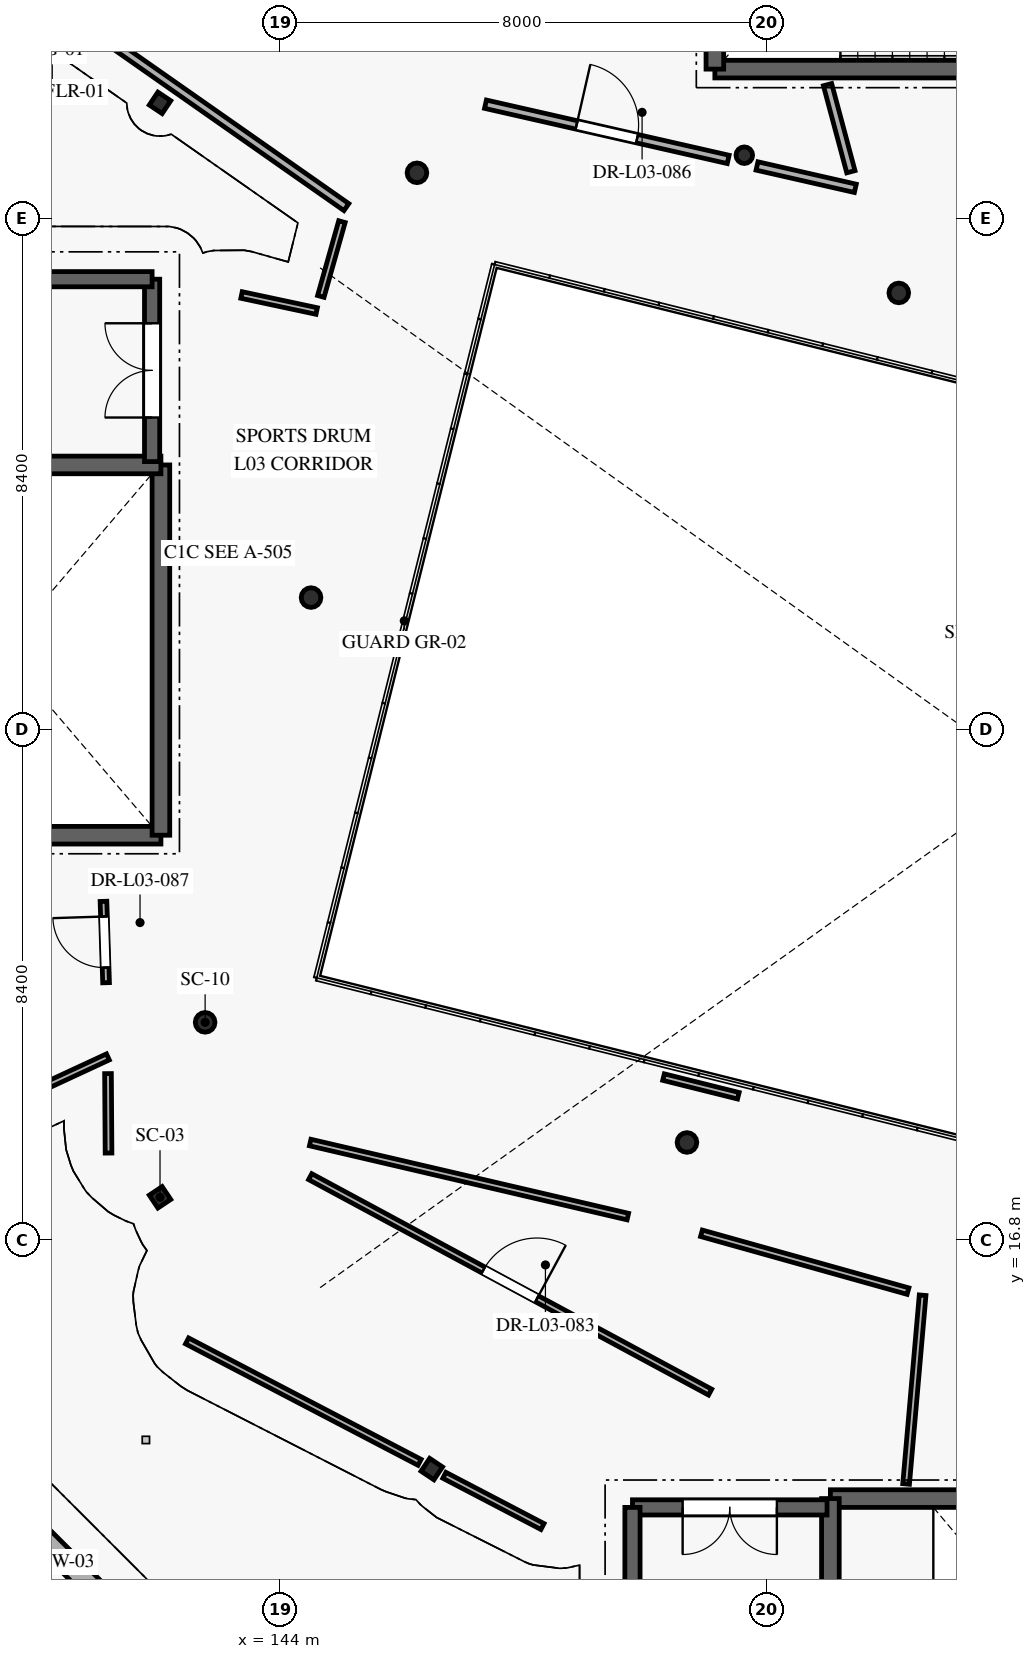
"""IFC4 building model, lengths in metres.
Left out: names, types, materials, properties, quantities, classifications, styles, units other than length and angle.
Written with IfcOpenShell. Run it as: python <this file> out.ifc"""

import sys

from ifc_helpers import new_model, si_unit, direction, frame, frame_2d, origin, origin_2d, place, context, subcontext, project, spatial, rectangle, hollow_circle, i_section, extrude, element, fill, save


model = new_model("IFC4")
c1 = context("Model", 3, precision=1e-05, world=origin(), true_north=direction((0.0, 1.0)))
c2 = subcontext(c1, "Body", "Model", "MODEL_VIEW")
j1 = project(units=[si_unit("LENGTHUNIT", "METRE"), si_unit("PLANEANGLEUNIT", "RADIAN")], contexts=[c1])
p1 = place(None, origin())
s1 = spatial("IfcSite", under=j1, at=p1, CompositionType="ELEMENT")
p2 = place(p1, origin())
s2 = spatial("IfcBuilding", under=s1, at=p2, CompositionType="ELEMENT")
p3 = place(p2, frame((0.0, 0.0, 12.6)))
s3 = spatial("IfcBuildingStorey", under=s2, at=p3, CompositionType="ELEMENT", Elevation=12.6)
for number, where, z_axis, x_axis in (
    (1, (142.772, 20.377, 0.0), (0.0, 0.0, 1.0), (0.97, -0.242, 0.0)),
    (2, (144.514, 27.364, 0.0), (0.0, 0.0, 1.0), (0.97, -0.242, 0.0)),
    (3, (146.256, 34.35, 0.0), (0.0, 0.0, 1.0), (0.97, -0.242, 0.0)),
    (4, (150.696, 18.402, 0.0), (0.0, 0.0, 1.0), (0.97, -0.242, 0.0)),
    (5, (154.18, 32.374, 0.0), (0.0, 0.0, 1.0), (0.97, -0.242, 0.0)),
):
    element("IfcColumn", number, at=place(p3, frame(where, z_axis=z_axis, x_axis=x_axis)), inside=s3, PredefinedType="COLUMN", context=c2, shape_type="SweptSolid", body=[
        extrude(hollow_circle(Radius=0.162, WallThickness=0.016, at=origin_2d()), origin(), (0.0, 0.0, 1.0), 4.2),
    ])
p4 = place(p3, frame((151.639, 34.639, 0.0), z_axis=(0.0, 0.0, 1.0), x_axis=(0.707106781187, -0.707106781187, 0.0)))
e6 = element("IfcColumn", 6, at=p4, inside=s3, PredefinedType="COLUMN", context=c2, shape_type="SweptSolid", body=[
    extrude(hollow_circle(Radius=0.136, WallThickness=0.012, at=origin_2d()), origin(), (0.0, 0.0, 1.0), 4.2),
])
for number, where, z_axis, x_axis in (
    (7, (142.03, 35.5, 0.0), (0.0, 0.0, 1.0), (-0.556, -0.831, 0.0)),
    (8, (142.03, 17.5, 0.0), (0.0, 0.0, 1.0), (0.556, -0.831, 0.0)),
    (9, (146.5, 13.03, 0.0), (0.0, 0.0, 1.0), (0.831, -0.556, 0.0)),
):
    element("IfcColumn", number, at=place(p3, frame(where, z_axis=z_axis, x_axis=x_axis)), inside=s3, PredefinedType="COLUMN", context=c2, shape_type="SweptSolid", body=[
        extrude(i_section(OverallWidth=0.255, OverallDepth=0.254, WebThickness=0.009, FlangeThickness=0.014, FilletRadius=0.013, at=origin_2d()), origin(), (0.0, 0.0, 1.0), 4.2),
    ])
p5 = place(p3, frame((143.484, 8.517, 0.0), z_axis=(0.0, 0.0, 1.0), x_axis=(-0.707106781187, 0.707106781187, 0.0)))
e10 = element("IfcWall", 10, at=p5, inside=s3, PredefinedType="SOLIDWALL", context=c2, shape_type="SweptSolid", body=[
    extrude(rectangle(XDim=8.439, YDim=0.35, at=frame_2d((4.219, 0.0))), origin(), (0.0, 0.0, 1.0), 3.94),
])
p6 = place(p5, frame((1.035, 0.0, 0.85)))
e11 = element("IfcOpeningElement", 11, at=p6, cuts=e10, PredefinedType="OPENING", context=c2, shape_type="SweptSolid", body=[
    extrude(rectangle(XDim=2.15, YDim=1.4, at=frame_2d((1.075, 0.7))), frame((0.0, 0.185, 0.0), z_axis=(0.0, -1.0, 0.0), x_axis=(1.0, 0.0, 0.0)), (0.0, 0.0, 1.0), 0.37),
])
p7 = place(p5, frame((5.179, 0.0, 0.85)))
e12 = element("IfcOpeningElement", 12, at=p7, cuts=e10, PredefinedType="OPENING", context=c2, shape_type="SweptSolid", body=[
    extrude(rectangle(XDim=2.3, YDim=1.4, at=frame_2d((1.15, 0.7))), frame((0.0, 0.185, 0.0), z_axis=(0.0, -1.0, 0.0), x_axis=(1.0, 0.0, 0.0)), (0.0, 0.0, 1.0), 0.37),
])
p8 = place(p3, frame((136.767, 13.586, 0.0), z_axis=(0.0, 0.0, 1.0), x_axis=(0.707106781187, -0.707106781187, 0.0)))
e13 = element("IfcWall", 13, at=p8, inside=s3, PredefinedType="ELEMENTEDWALL", context=c2, shape_type="SweptSolid", body=[
    extrude(rectangle(XDim=8.23, YDim=0.225, at=frame_2d((4.115, 0.0))), origin(), (0.0, 0.0, 1.0), 1.09),
])
p9 = place(p3, frame((151.155, 36.055, 0.0), z_axis=(0.0, 0.0, 1.0), x_axis=(1.0, 0.0, 0.0)))
e14 = element("IfcWall", 14, at=p9, inside=s3, PredefinedType="SHEAR", context=c2, shape_type="SweptSolid", body=[
    extrude(rectangle(XDim=6.89, YDim=0.29, at=frame_2d((3.445, 0.0))), origin(), (0.0, 0.0, 1.0), 3.95),
])
p10 = place(p3, frame((151.155, 42.345, 0.0), z_axis=(0.0, 0.0, 1.0), x_axis=(0.0, -1.0, 0.0)))
e15 = element("IfcWall", 15, at=p10, inside=s3, PredefinedType="SHEAR", context=c2, shape_type="SweptSolid", body=[
    extrude(rectangle(XDim=6.29, YDim=0.29, at=frame_2d((3.145, 0.0))), origin(), (0.0, 0.0, 1.0), 3.95),
])
p11 = place(p3, frame((159.945, 12.545, 0.0), z_axis=(0.0, 0.0, 1.0), x_axis=(-1.0, 0.0, 0.0)))
e16 = element("IfcWall", 16, at=p11, inside=s3, PredefinedType="SHEAR", context=c2, shape_type="SweptSolid", body=[
    extrude(rectangle(XDim=6.89, YDim=0.29, at=frame_2d((3.445, 0.0))), origin(), (0.0, 0.0, 1.0), 3.95),
])
p12 = place(p3, frame((153.055, 12.545, 0.0), z_axis=(0.0, 0.0, 1.0), x_axis=(0.0, -1.0, 0.0)))
e17 = element("IfcWall", 17, at=p12, inside=s3, PredefinedType="SHEAR", context=c2, shape_type="SweptSolid", body=[
    extrude(rectangle(XDim=6.29, YDim=0.29, at=frame_2d((3.145, 0.0))), origin(), (0.0, 0.0, 1.0), 3.95),
])
p13 = place(p12, frame((2.52, 0.0, 0.0)))
e18 = element("IfcOpeningElement", 18, at=p13, cuts=e17, PredefinedType="OPENING", context=c2, shape_type="SweptSolid", body=[
    extrude(rectangle(XDim=1.25, YDim=2.1, at=frame_2d((0.625, 1.05))), frame((0.0, 0.155, 0.0), z_axis=(0.0, -1.0, 0.0), x_axis=(1.0, 0.0, 0.0)), (0.0, 0.0, 1.0), 0.31),
])
p14 = place(p3, frame((153.0, 12.4, 0.0), z_axis=(0.0, 0.0, 1.0), x_axis=(-1.0, 0.0, 0.0)))
e19 = element("IfcWall", 19, at=p14, inside=s3, PredefinedType="SHEAR", context=c2, shape_type="SweptSolid", body=[
    extrude(rectangle(XDim=3.2, YDim=0.25, at=frame_2d((1.6, 0.0))), origin(), (0.0, 0.0, 1.0), 3.95),
])
p15 = place(p14, frame((0.825, 0.0, 0.0)))
e20 = element("IfcOpeningElement", 20, at=p15, cuts=e19, PredefinedType="OPENING", context=c2, shape_type="SweptSolid", body=[
    extrude(rectangle(XDim=1.55, YDim=2.15, at=frame_2d((0.775, 1.075))), frame((0.0, 0.135, 0.0), z_axis=(0.0, -1.0, 0.0), x_axis=(1.0, 0.0, 0.0)), (0.0, 0.0, 1.0), 0.27),
])
p16 = place(p3, frame((149.8, 12.4, 0.0), z_axis=(0.0, 0.0, 1.0), x_axis=(0.0, -1.0, 0.0)))
e21 = element("IfcWall", 21, at=p16, inside=s3, PredefinedType="SHEAR", context=c2, shape_type="SweptSolid", body=[
    extrude(rectangle(XDim=6.0, YDim=0.25, at=frame_2d((3.0, 0.0))), origin(), (0.0, 0.0, 1.0), 3.95),
])
p17 = place(p3, frame((135.255, 23.455, 0.0), z_axis=(0.0, 0.0, 1.0), x_axis=(1.0, 0.0, 0.0)))
e22 = element("IfcWall", 22, at=p17, inside=s3, PredefinedType="SHEAR", context=c2, shape_type="SweptSolid", body=[
    extrude(rectangle(XDim=6.79, YDim=0.29, at=frame_2d((3.395, 0.0))), origin(), (0.0, 0.0, 1.0), 3.95),
])
p18 = place(p3, frame((142.045, 23.455, 0.0), z_axis=(0.0, 0.0, 1.0), x_axis=(0.0, 1.0, 0.0)))
e23 = element("IfcWall", 23, at=p18, inside=s3, PredefinedType="SHEAR", context=c2, shape_type="SweptSolid", body=[
    extrude(rectangle(XDim=6.09, YDim=0.29, at=frame_2d((3.045, 0.0))), origin(), (0.0, 0.0, 1.0), 3.95),
])
p19 = place(p3, frame((142.045, 29.545, 0.0), z_axis=(0.0, 0.0, 1.0), x_axis=(-1.0, 0.0, 0.0)))
e24 = element("IfcWall", 24, at=p19, inside=s3, PredefinedType="SHEAR", context=c2, shape_type="SweptSolid", body=[
    extrude(rectangle(XDim=6.79, YDim=0.29, at=frame_2d((3.395, 0.0))), origin(), (0.0, 0.0, 1.0), 3.95),
])
p20 = place(p19, frame((5.25, 0.0, 0.0)))
e25 = element("IfcOpeningElement", 25, at=p20, cuts=e24, PredefinedType="OPENING", context=c2, shape_type="SweptSolid", body=[
    extrude(rectangle(XDim=1.15, YDim=2.1, at=frame_2d((0.575, 1.05))), frame((0.0, 0.155, 0.0), z_axis=(0.0, -1.0, 0.0), x_axis=(1.0, 0.0, 0.0)), (0.0, 0.0, 1.0), 0.31),
])
p21 = place(p3, frame((141.9, 29.6, 0.0), z_axis=(0.0, 0.0, 1.0), x_axis=(0.0, 1.0, 0.0)))
e26 = element("IfcWall", 26, at=p21, inside=s3, PredefinedType="SHEAR", context=c2, shape_type="SweptSolid", body=[
    extrude(rectangle(XDim=3.0, YDim=0.25, at=frame_2d((1.5, 0.0))), origin(), (0.0, 0.0, 1.0), 3.95),
])
p22 = place(p21, frame((0.725, 0.0, 0.0)))
e27 = element("IfcOpeningElement", 27, at=p22, cuts=e26, PredefinedType="OPENING", context=c2, shape_type="SweptSolid", body=[
    extrude(rectangle(XDim=1.55, YDim=2.15, at=frame_2d((0.775, 1.075))), frame((0.0, 0.135, 0.0), z_axis=(0.0, -1.0, 0.0), x_axis=(1.0, 0.0, 0.0)), (0.0, 0.0, 1.0), 0.27),
])
p23 = place(p3, frame((141.9, 32.6, 0.0), z_axis=(0.0, 0.0, 1.0), x_axis=(-1.0, 0.0, 0.0)))
e28 = element("IfcWall", 28, at=p23, inside=s3, PredefinedType="SHEAR", context=c2, shape_type="SweptSolid", body=[
    extrude(rectangle(XDim=6.5, YDim=0.25, at=frame_2d((3.25, 0.0))), origin(), (0.0, 0.0, 1.0), 3.95),
])
p24 = place(p3, frame((141.173, 19.809, 0.0), z_axis=(0.0, 0.0, 1.0), x_axis=(-0.90703456181, -0.421056176397, 0.0)))
e29 = element("IfcWall", 29, at=p24, inside=s3, PredefinedType="PARTITIONING", context=c2, shape_type="SweptSolid", body=[
    extrude(rectangle(XDim=5.205, YDim=0.11, at=frame_2d((2.602, 0.0))), origin(), (0.0, 0.0, 1.0), 3.95),
])
p25 = place(p3, frame((154.3, 12.785, 0.0), z_axis=(0.0, 0.0, 1.0), x_axis=(0.08719416146, 0.996191336143, 0.0)))
e30 = element("IfcWall", 30, at=p25, inside=s3, PredefinedType="PARTITIONING", context=c2, shape_type="SweptSolid", body=[
    extrude(rectangle(XDim=3.116, YDim=0.11, at=frame_2d((1.558, 0.0))), origin(), (0.0, 0.0, 1.0), 3.95),
])
p26 = place(p3, frame((154.331, 15.957, 0.0), z_axis=(0.0, 0.0, 1.0), x_axis=(-0.96293957609, 0.269717208943, 0.0)))
e31 = element("IfcWall", 31, at=p26, inside=s3, PredefinedType="PARTITIONING", context=c2, shape_type="SweptSolid", body=[
    extrude(rectangle(XDim=3.527, YDim=0.11, at=frame_2d((1.764, 0.0))), origin(), (0.0, 0.0, 1.0), 3.95),
])
p27 = place(p3, frame((151.541, 19.17, 0.0), z_axis=(0.0, 0.0, 1.0), x_axis=(-0.970278241174, 0.241992013721, 0.0)))
e32 = element("IfcWall", 32, at=p27, inside=s3, PredefinedType="PARTITIONING", context=c2, shape_type="SweptSolid", body=[
    extrude(rectangle(XDim=1.268, YDim=0.11, at=frame_2d((0.634, 0.0))), origin(), (0.0, 0.0, 1.0), 3.95),
])
p28 = place(p3, frame((149.724, 17.183, 0.0), z_axis=(0.0, 0.0, 1.0), x_axis=(-0.973885509314, 0.227039676596, 0.0)))
e33 = element("IfcWall", 33, at=p28, inside=s3, PredefinedType="PARTITIONING", context=c2, shape_type="SweptSolid", body=[
    extrude(rectangle(XDim=5.364, YDim=0.11, at=frame_2d((2.682, 0.0))), origin(), (0.0, 0.0, 1.0), 3.95),
])
p29 = place(p3, frame((144.5, 17.84, 0.0), z_axis=(0.0, 0.0, 1.0), x_axis=(0.880350401945, -0.474323908101, 0.0)))
e34 = element("IfcWall", 34, at=p29, inside=s3, PredefinedType="PARTITIONING", context=c2, shape_type="SweptSolid", body=[
    extrude(rectangle(XDim=7.471, YDim=0.11, at=frame_2d((3.735, 0.0))), origin(), (0.0, 0.0, 1.0), 3.95),
])
p30 = place(p29, frame((3.236, 0.0, 0.0)))
e35 = element("IfcOpeningElement", 35, at=p30, cuts=e34, PredefinedType="OPENING", context=c2, shape_type="SweptSolid", body=[
    extrude(rectangle(XDim=1.0, YDim=2.1, at=frame_2d((0.5, 1.05))), frame((0.0, 0.065, 0.0), z_axis=(0.0, -1.0, 0.0), x_axis=(1.0, 0.0, 0.0)), (0.0, 0.0, 1.0), 0.13),
])
p31 = place(p3, frame((148.32, 12.085, 0.0), z_axis=(0.0, 0.0, 1.0), x_axis=(-0.886374313461, 0.46296930399, 0.0)))
e36 = element("IfcWall", 36, at=p31, inside=s3, PredefinedType="PARTITIONING", context=c2, shape_type="SweptSolid", body=[
    extrude(rectangle(XDim=1.82, YDim=0.11, at=frame_2d((0.91, 0.0))), origin(), (0.0, 0.0, 1.0), 3.95),
])
p32 = place(p3, frame((146.299, 13.141, 0.0), z_axis=(0.0, 0.0, 1.0), x_axis=(-0.886374847625, 0.462968281309, 0.0)))
e37 = element("IfcWall", 37, at=p32, inside=s3, PredefinedType="PARTITIONING", context=c2, shape_type="SweptSolid", body=[
    extrude(rectangle(XDim=4.314, YDim=0.11, at=frame_2d((2.157, 0.0))), origin(), (0.0, 0.0, 1.0), 3.424),
])
p33 = place(p3, frame((141.184, 18.228, 0.0), z_axis=(0.0, 0.0, 1.0), x_axis=(-0.006727562196, 0.999977369697, 0.0)))
e38 = element("IfcWall", 38, at=p33, inside=s3, PredefinedType="PARTITIONING", context=c2, shape_type="SweptSolid", body=[
    extrude(rectangle(XDim=1.306, YDim=0.11, at=frame_2d((0.653, 0.0))), origin(), (0.0, 0.0, 1.0), 3.95),
])
p34 = place(p3, frame((147.383, 35.478, 0.0), z_axis=(0.0, 0.0, 1.0), x_axis=(0.97509006868, -0.221809282857, 0.0)))
e39 = element("IfcWall", 39, at=p34, inside=s3, PredefinedType="PLUMBINGWALL", context=c2, shape_type="SweptSolid", body=[
    extrude(rectangle(XDim=4.094, YDim=0.14, at=frame_2d((2.047, 0.0))), origin(), (0.0, 0.0, 1.0), 3.94),
])
p35 = place(p34, frame((1.537, 0.0, 0.0)))
e40 = element("IfcOpeningElement", 40, at=p35, cuts=e39, PredefinedType="OPENING", context=c2, shape_type="SweptSolid", body=[
    extrude(rectangle(XDim=1.02, YDim=2.06, at=frame_2d((0.51, 1.03))), frame((0.0, 0.08, 0.0), z_axis=(0.0, -1.0, 0.0), x_axis=(1.0, 0.0, 0.0)), (0.0, 0.0, 1.0), 0.16),
])
p36 = place(p3, frame((151.848, 34.462, 0.0), z_axis=(0.0, 0.0, 1.0), x_axis=(0.975083667175, -0.221837422469, 0.0)))
e41 = element("IfcWall", 41, at=p36, inside=s3, PredefinedType="PLUMBINGWALL", context=c2, shape_type="SweptSolid", body=[
    extrude(rectangle(XDim=1.658, YDim=0.14, at=frame_2d((0.829, 0.0))), origin(), (0.0, 0.0, 1.0), 3.94),
])
p37 = place(p3, frame((153.392, 34.367, 0.0), z_axis=(0.0, 0.0, 1.0), x_axis=(-0.258768997543, 0.965939235103, 0.0)))
e42 = element("IfcWall", 42, at=p37, inside=s3, PredefinedType="PLUMBINGWALL", context=c2, shape_type="SweptSolid", body=[
    extrude(rectangle(XDim=1.483, YDim=0.14, at=frame_2d((0.742, 0.0))), origin(), (0.0, 0.0, 1.0), 3.94),
])
p38 = place(p3, frame((137.991, 38.76, 0.0), z_axis=(0.0, 0.0, 1.0), x_axis=(0.819151233973, -0.5735775936, 0.0)))
e43 = element("IfcWall", 43, at=p38, inside=s3, PredefinedType="PLUMBINGWALL", context=c2, shape_type="SweptSolid", body=[
    extrude(rectangle(XDim=8.672, YDim=0.14, at=frame_2d((4.336, 0.0))), origin(), (0.0, 0.0, 1.0), 3.94),
])
p39 = place(p3, frame((141.143, 21.029, 0.0), z_axis=(0.0, 0.0, 1.0), x_axis=(-0.032094386476, 0.999484842485, 0.0)))
e44 = element("IfcWall", 44, at=p39, inside=s3, PredefinedType="PARTITIONING", context=c2, shape_type="SweptSolid", body=[
    extrude(rectangle(XDim=1.339, YDim=0.11, at=frame_2d((0.669, 0.0))), origin(), (0.0, 0.0, 1.0), 3.95),
])
p40 = place(p39, frame((0.25, 0.0, 0.0)))
e45 = element("IfcOpeningElement", 45, at=p40, cuts=e44, PredefinedType="OPENING", context=c2, shape_type="SweptSolid", body=[
    extrude(rectangle(XDim=0.84, YDim=2.04, at=frame_2d((0.42, 1.02))), frame((0.0, 0.065, 0.0), z_axis=(0.0, -1.0, 0.0), x_axis=(1.0, 0.0, 0.0)), (0.0, 0.0, 1.0), 0.13),
])
p41 = place(p3, frame((143.371, 32.34, 0.0), z_axis=(0.0, 0.0, 1.0), x_axis=(0.977988631183, -0.208658182868, 0.0)))
e46 = element("IfcWall", 46, at=p41, inside=s3, PredefinedType="PARTITIONING", context=c2, shape_type="SweptSolid", body=[
    extrude(rectangle(XDim=1.264, YDim=0.11, at=frame_2d((0.632, 0.0))), origin(), (0.0, 0.0, 1.0), 3.95),
])
p42 = place(p3, frame((144.675, 32.317, 0.0), z_axis=(0.0, 0.0, 1.0), x_axis=(0.271591717188, 0.962412561823, 0.0)))
e47 = element("IfcWall", 47, at=p42, inside=s3, PredefinedType="PARTITIONING", context=c2, shape_type="SweptSolid", body=[
    extrude(rectangle(XDim=1.278, YDim=0.11, at=frame_2d((0.639, 0.0))), origin(), (0.0, 0.0, 1.0), 3.95),
])
p43 = place(p15, origin())
e48 = element("IfcDoor", 48, at=p43, inside=s3, OperationType="DOUBLE_DOOR_SINGLE_SWING", PredefinedType="DOOR", context=c2, shape_type="SweptSolid", body=[
    extrude(rectangle(XDim=1.55, YDim=2.15, at=frame_2d((0.775, 1.075))), frame((0.0, 0.025, 0.0), z_axis=(0.0, -1.0, 0.0), x_axis=(1.0, 0.0, 0.0)), (0.0, 0.0, 1.0), 0.05),
])
fill(e20, e48)
p44 = place(p22, origin())
e49 = element("IfcDoor", 49, at=p44, inside=s3, OperationType="DOUBLE_DOOR_SINGLE_SWING", PredefinedType="DOOR", context=c2, shape_type="SweptSolid", body=[
    extrude(rectangle(XDim=1.55, YDim=2.15, at=frame_2d((0.775, 1.075))), frame((0.0, 0.025, 0.0), z_axis=(0.0, -1.0, 0.0), x_axis=(1.0, 0.0, 0.0)), (0.0, 0.0, 1.0), 0.05),
])
fill(e27, e49)
p45 = place(p30, origin())
e50 = element("IfcDoor", 50, at=p45, inside=s3, OperationType="SINGLE_SWING_RIGHT", PredefinedType="DOOR", context=c2, shape_type="SweptSolid", body=[
    extrude(rectangle(XDim=1.0, YDim=2.1, at=frame_2d((0.5, 1.05))), frame((0.0, 0.025, 0.0), z_axis=(0.0, -1.0, 0.0), x_axis=(1.0, 0.0, 0.0)), (0.0, 0.0, 1.0), 0.05),
])
fill(e35, e50)
p46 = place(p35, frame((1.02, 0.0, 0.0), z_axis=(0.0, 0.0, 1.0), x_axis=(-1.0, 0.0, 0.0)))
e51 = element("IfcDoor", 51, at=p46, inside=s3, OperationType="SINGLE_SWING_LEFT", PredefinedType="DOOR", context=c2, shape_type="SweptSolid", body=[
    extrude(rectangle(XDim=1.02, YDim=2.06, at=frame_2d((0.51, 1.03))), frame((0.0, 0.025, 0.0), z_axis=(0.0, -1.0, 0.0), x_axis=(1.0, 0.0, 0.0)), (0.0, 0.0, 1.0), 0.05),
])
fill(e40, e51)
p47 = place(p40, origin())
e52 = element("IfcDoor", 52, at=p47, inside=s3, OperationType="SINGLE_SWING_RIGHT", PredefinedType="DOOR", context=c2, shape_type="SweptSolid", body=[
    extrude(rectangle(XDim=0.84, YDim=2.04, at=frame_2d((0.42, 1.02))), frame((0.0, 0.025, 0.0), z_axis=(0.0, -1.0, 0.0), x_axis=(1.0, 0.0, 0.0)), (0.0, 0.0, 1.0), 0.05),
])
fill(e45, e52)
save(model, sys.argv[1])
